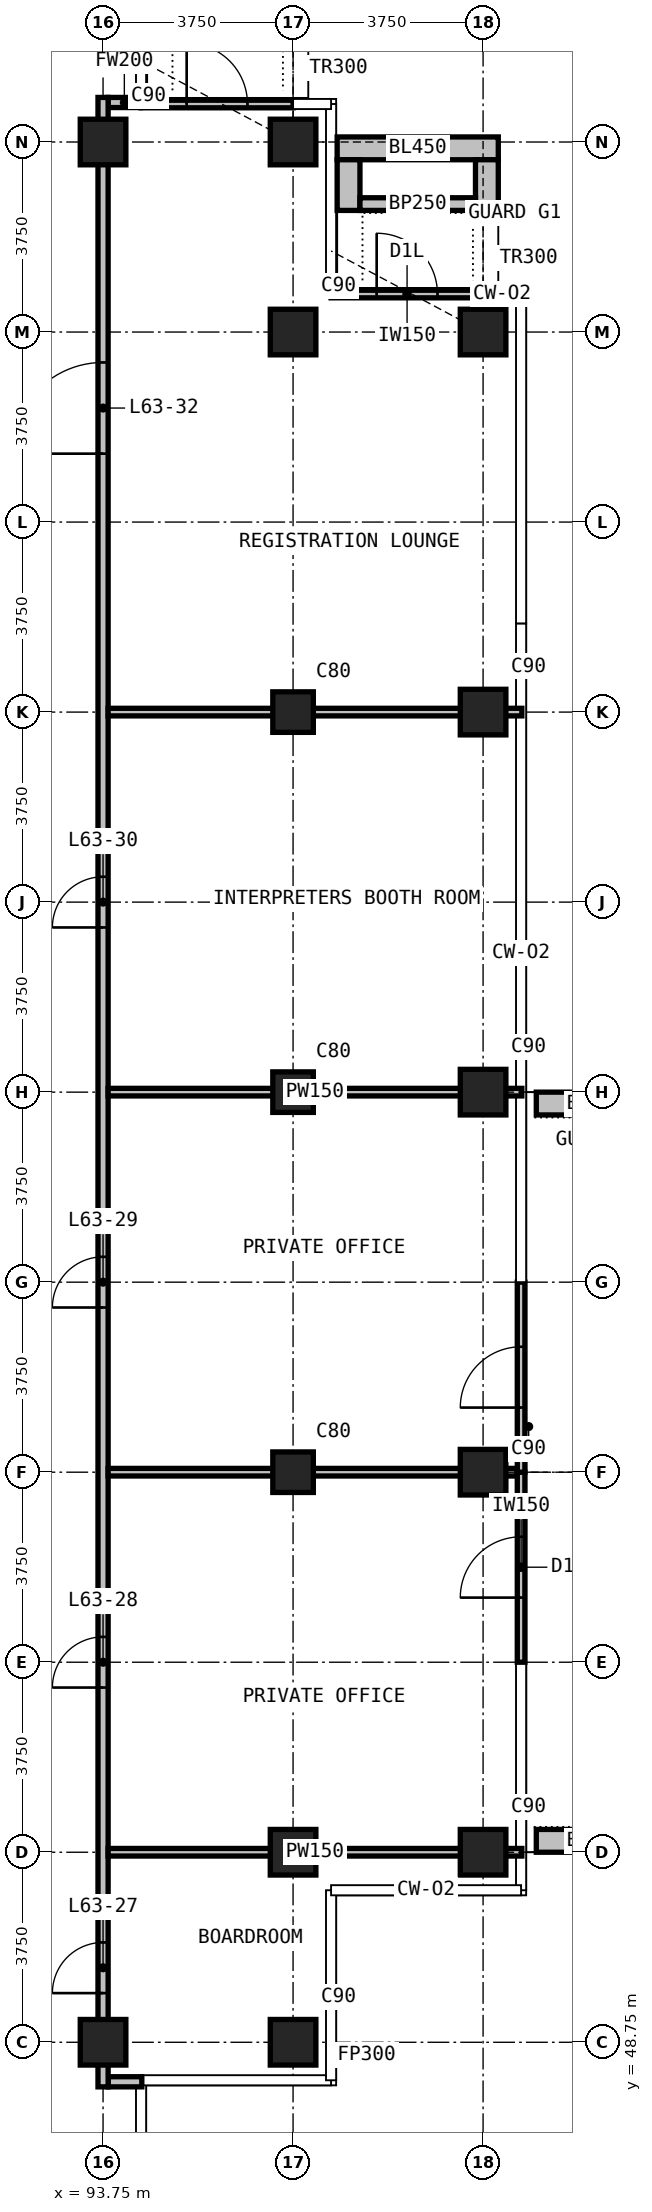
"""IFC4 building model, lengths in metres.
Left out: names, types, materials, properties, quantities, classifications, styles, units other than length and angle.
Written with IfcOpenShell. Run it as: python <this file> out.ifc"""

import sys

from ifc_helpers import new_model, si_unit, direction, frame, frame_2d, origin, origin_2d, place, context, subcontext, project, spatial, rectangle, extrude, element, fill, save


model = new_model("IFC4")
c1 = context("Model", 3, precision=1e-05, world=origin(), true_north=direction((0.0, 1.0)))
c2 = subcontext(c1, "Body", "Model", "MODEL_VIEW")
j1 = project(units=[si_unit("LENGTHUNIT", "METRE"), si_unit("PLANEANGLEUNIT", "RADIAN")], contexts=[c1])
p1 = place(None, origin())
s1 = spatial("IfcSite", under=j1, at=p1, CompositionType="ELEMENT")
p2 = place(p1, origin())
s2 = spatial("IfcBuilding", under=s1, at=p2, CompositionType="ELEMENT")
p3 = place(p2, frame((0.0, 0.0, 242.7)))
s3 = spatial("IfcBuildingStorey", under=s2, at=p3, CompositionType="ELEMENT", Elevation=242.7)
for number, where, z_axis, x_axis in (
    (1, (93.75, 48.75, 0.0), (0.0, 0.0, 1.0), (1.0, 0.0, 0.0)),
    (2, (93.75, 86.25, 0.0), (0.0, 0.0, 1.0), (1.0, 0.0, 0.0)),
    (3, (97.5, 48.75, 0.0), (0.0, 0.0, 1.0), (1.0, 0.0, 0.0)),
    (4, (97.5, 52.5, 0.0), (0.0, 0.0, 1.0), (1.0, 0.0, 0.0)),
):
    element("IfcColumn", number, at=place(p3, frame(where, z_axis=z_axis, x_axis=x_axis)), inside=s3, PredefinedType="COLUMN", context=c2, shape_type="SweptSolid", body=[
        extrude(rectangle(XDim=0.9, YDim=0.9, at=origin_2d()), origin(), (0.0, 0.0, 1.0), 3.6),
    ])
for number, where, z_axis, x_axis in (
    (5, (97.5, 60.0, 0.0), (0.0, 0.0, 1.0), (1.0, 0.0, 0.0)),
    (6, (97.5, 67.5, 0.0), (0.0, 0.0, 1.0), (1.0, 0.0, 0.0)),
    (7, (97.5, 75.0, 0.0), (0.0, 0.0, 1.0), (1.0, 0.0, 0.0)),
):
    element("IfcColumn", number, at=place(p3, frame(where, z_axis=z_axis, x_axis=x_axis)), inside=s3, PredefinedType="COLUMN", context=c2, shape_type="SweptSolid", body=[
        extrude(rectangle(XDim=0.8, YDim=0.8, at=origin_2d()), origin(), (0.0, 0.0, 1.0), 3.6),
    ])
for number, where, z_axis, x_axis in (
    (8, (97.5, 82.5, 0.0), (0.0, 0.0, 1.0), (1.0, 0.0, 0.0)),
    (9, (97.5, 86.25, 0.0), (0.0, 0.0, 1.0), (1.0, 0.0, 0.0)),
    (10, (101.25, 52.5, 0.0), (0.0, 0.0, 1.0), (1.0, 0.0, 0.0)),
    (11, (101.25, 60.0, 0.0), (0.0, 0.0, 1.0), (1.0, 0.0, 0.0)),
    (12, (101.25, 67.5, 0.0), (0.0, 0.0, 1.0), (1.0, 0.0, 0.0)),
    (13, (101.25, 75.0, 0.0), (0.0, 0.0, 1.0), (1.0, 0.0, 0.0)),
    (14, (101.25, 82.5, 0.0), (0.0, 0.0, 1.0), (1.0, 0.0, 0.0)),
):
    element("IfcColumn", number, at=place(p3, frame(where, z_axis=z_axis, x_axis=x_axis)), inside=s3, PredefinedType="COLUMN", context=c2, shape_type="SweptSolid", body=[
        extrude(rectangle(XDim=0.9, YDim=0.9, at=origin_2d()), origin(), (0.0, 0.0, 1.0), 3.6),
    ])
p4 = place(p3, frame((102.0, 56.25, 0.0), z_axis=(0.0, 0.0, 1.0), x_axis=(0.0, 1.0, 0.0)))
e15 = element("IfcWall", 15, at=p4, inside=s3, PredefinedType="SOLIDWALL", context=c2, shape_type="SweptSolid", body=[
    extrude(rectangle(XDim=3.75, YDim=0.15, at=frame_2d((1.875, 0.0))), origin(), (0.0, 0.0, 1.0), 3.3),
])
p5 = place(p4, frame((1.275, 0.0, 0.0)))
e16 = element("IfcOpeningElement", 16, at=p5, cuts=e15, PredefinedType="OPENING", context=c2, shape_type="SweptSolid", body=[
    extrude(rectangle(XDim=1.2, YDim=2.4, at=frame_2d((0.6, 1.2))), frame((0.0, 0.085, 0.0), z_axis=(0.0, -1.0, 0.0), x_axis=(1.0, 0.0, 0.0)), (0.0, 0.0, 1.0), 0.17),
])
p6 = place(p3, frame((102.0, 60.0, 0.0), z_axis=(0.0, 0.0, 1.0), x_axis=(0.0, 1.0, 0.0)))
e17 = element("IfcWall", 17, at=p6, inside=s3, PredefinedType="SOLIDWALL", context=c2, shape_type="SweptSolid", body=[
    extrude(rectangle(XDim=3.75, YDim=0.15, at=frame_2d((1.875, 0.0))), origin(), (0.0, 0.0, 1.0), 3.3),
])
p7 = place(p6, frame((1.275, 0.0, 0.0)))
e18 = element("IfcOpeningElement", 18, at=p7, cuts=e17, PredefinedType="OPENING", context=c2, shape_type="SweptSolid", body=[
    extrude(rectangle(XDim=1.2, YDim=2.4, at=frame_2d((0.6, 1.2))), frame((0.0, 0.085, 0.0), z_axis=(0.0, -1.0, 0.0), x_axis=(1.0, 0.0, 0.0)), (0.0, 0.0, 1.0), 0.17),
])
p8 = place(p3, frame((98.25, 83.25, 0.0), z_axis=(0.0, 0.0, 1.0), x_axis=(1.0, 0.0, 0.0)))
e19 = element("IfcWall", 19, at=p8, inside=s3, PredefinedType="SOLIDWALL", context=c2, shape_type="SweptSolid", body=[
    extrude(rectangle(XDim=3.0, YDim=0.15, at=frame_2d((1.5, 0.0))), origin(), (0.0, 0.0, 1.0), 3.3),
])
p9 = place(p8, frame((0.9, 0.0, 0.0)))
e20 = element("IfcOpeningElement", 20, at=p9, cuts=e19, PredefinedType="OPENING", context=c2, shape_type="SweptSolid", body=[
    extrude(rectangle(XDim=1.2, YDim=2.0, at=frame_2d((0.6, 1.0))), frame((0.0, 0.085, 0.0), z_axis=(0.0, -1.0, 0.0), x_axis=(1.0, 0.0, 0.0)), (0.0, 0.0, 1.0), 0.17),
])
p10 = place(p3, frame((94.5, 87.0, 0.0), z_axis=(0.0, 0.0, 1.0), x_axis=(1.0, 0.0, 0.0)))
e21 = element("IfcWall", 21, at=p10, inside=s3, PredefinedType="SOLIDWALL", context=c2, shape_type="SweptSolid", body=[
    extrude(rectangle(XDim=3.0, YDim=0.15, at=frame_2d((1.5, 0.0))), origin(), (0.0, 0.0, 1.0), 3.3),
])
p11 = place(p10, frame((0.9, 0.0, 0.0)))
e22 = element("IfcOpeningElement", 22, at=p11, cuts=e21, PredefinedType="OPENING", context=c2, shape_type="SweptSolid", body=[
    extrude(rectangle(XDim=1.2, YDim=2.0, at=frame_2d((0.6, 1.0))), frame((0.0, 0.085, 0.0), z_axis=(0.0, -1.0, 0.0), x_axis=(1.0, 0.0, 0.0)), (0.0, 0.0, 1.0), 0.17),
])
for number, where, z_axis, x_axis in (
    (23, (102.3, 52.725, 0.0), (0.0, 0.0, 1.0), (1.0, 0.0, 0.0)),
    (24, (102.3, 67.275, 0.0), (0.0, 0.0, 1.0), (1.0, 0.0, 0.0)),
):
    element("IfcWall", number, at=place(p3, frame(where, z_axis=z_axis, x_axis=x_axis)), inside=s3, PredefinedType="USERDEFINED", context=c2, shape_type="SweptSolid", body=[
        extrude(rectangle(XDim=2.35, YDim=0.45, at=frame_2d((1.175, 0.0))), origin(), (0.0, 0.0, 1.0), 1.1),
    ])
p12 = place(p3, frame((98.37, 86.125, 0.0), z_axis=(0.0, 0.0, 1.0), x_axis=(1.0, 0.0, 0.0)))
e25 = element("IfcWall", 25, at=p12, inside=s3, PredefinedType="USERDEFINED", context=c2, shape_type="SweptSolid", body=[
    extrude(rectangle(XDim=3.18, YDim=0.45, at=frame_2d((1.59, 0.0))), origin(), (0.0, 0.0, 1.0), 1.1),
])
for number, where, z_axis, x_axis in (
    (26, (98.595, 84.9, 0.0), (0.0, 0.0, 1.0), (0.0, 1.0, 0.0)),
    (27, (101.325, 84.9, 0.0), (0.0, 0.0, 1.0), (0.0, 1.0, 0.0)),
):
    element("IfcWall", number, at=place(p3, frame(where, z_axis=z_axis, x_axis=x_axis)), inside=s3, PredefinedType="USERDEFINED", context=c2, shape_type="SweptSolid", body=[
        extrude(rectangle(XDim=1.0, YDim=0.45, at=frame_2d((0.5, 0.0))), origin(), (0.0, 0.0, 1.0), 1.1),
    ])
p13 = place(p3, frame((98.82, 85.025, 0.0), z_axis=(0.0, 0.0, 1.0), x_axis=(1.0, 0.0, 0.0)))
e28 = element("IfcWall", 28, at=p13, inside=s3, PredefinedType="USERDEFINED", context=c2, shape_type="SweptSolid", body=[
    extrude(rectangle(XDim=2.28, YDim=0.25, at=frame_2d((1.14, 0.0))), origin(), (0.0, 0.0, 1.0), 1.0),
])
p14 = place(p3, frame((93.85, 47.97, 0.0), z_axis=(0.0, 0.0, 1.0), x_axis=(1.0, 0.0, 0.0)))
e29 = element("IfcWall", 29, at=p14, inside=s3, PredefinedType="PARTITIONING", context=c2, shape_type="SweptSolid", body=[
    extrude(rectangle(XDim=0.665, YDim=0.2, at=frame_2d((0.333, 0.0))), origin(), (0.0, 0.0, 1.0), 3.3),
])
p15 = place(p3, frame((93.85, 87.03, 0.0), z_axis=(0.0, 0.0, 1.0), x_axis=(1.0, 0.0, 0.0)))
e30 = element("IfcWall", 30, at=p15, inside=s3, PredefinedType="PARTITIONING", context=c2, shape_type="SweptSolid", body=[
    extrude(rectangle(XDim=0.64, YDim=0.2, at=frame_2d((0.32, 0.0))), origin(), (0.0, 0.0, 1.0), 3.3),
])
p16 = place(p3, frame((93.75, 47.87, 0.0), z_axis=(0.0, 0.0, 1.0), x_axis=(0.0, 1.0, 0.0)))
e31 = element("IfcWall", 31, at=p16, inside=s3, PredefinedType="PARTITIONING", context=c2, shape_type="SweptSolid", body=[
    extrude(rectangle(XDim=39.26, YDim=0.2, at=frame_2d((19.63, 0.0))), origin(), (0.0, 0.0, 1.0), 3.3),
])
p17 = place(p16, frame((1.85, 0.0, 0.0)))
e32 = element("IfcOpeningElement", 32, at=p17, cuts=e31, PredefinedType="OPENING", context=c2, shape_type="SweptSolid", body=[
    extrude(rectangle(XDim=1.0, YDim=2.2, at=frame_2d((0.5, 1.1))), frame((0.0, 0.11, 0.0), z_axis=(0.0, -1.0, 0.0), x_axis=(1.0, 0.0, 0.0)), (0.0, 0.0, 1.0), 0.22),
])
p18 = place(p16, frame((7.88, 0.0, 0.0)))
e33 = element("IfcOpeningElement", 33, at=p18, cuts=e31, PredefinedType="OPENING", context=c2, shape_type="SweptSolid", body=[
    extrude(rectangle(XDim=1.0, YDim=2.2, at=frame_2d((0.5, 1.1))), frame((0.0, 0.11, 0.0), z_axis=(0.0, -1.0, 0.0), x_axis=(1.0, 0.0, 0.0)), (0.0, 0.0, 1.0), 0.22),
])
p19 = place(p16, frame((15.38, 0.0, 0.0)))
e34 = element("IfcOpeningElement", 34, at=p19, cuts=e31, PredefinedType="OPENING", context=c2, shape_type="SweptSolid", body=[
    extrude(rectangle(XDim=1.0, YDim=2.2, at=frame_2d((0.5, 1.1))), frame((0.0, 0.11, 0.0), z_axis=(0.0, -1.0, 0.0), x_axis=(1.0, 0.0, 0.0)), (0.0, 0.0, 1.0), 0.22),
])
p20 = place(p16, frame((22.88, 0.0, 0.0)))
e35 = element("IfcOpeningElement", 35, at=p20, cuts=e31, PredefinedType="OPENING", context=c2, shape_type="SweptSolid", body=[
    extrude(rectangle(XDim=1.0, YDim=2.2, at=frame_2d((0.5, 1.1))), frame((0.0, 0.11, 0.0), z_axis=(0.0, -1.0, 0.0), x_axis=(1.0, 0.0, 0.0)), (0.0, 0.0, 1.0), 0.22),
])
p21 = place(p16, frame((32.23, 0.0, 0.0)))
e36 = element("IfcOpeningElement", 36, at=p21, cuts=e31, PredefinedType="OPENING", context=c2, shape_type="SweptSolid", body=[
    extrude(rectangle(XDim=1.8, YDim=2.2, at=frame_2d((0.9, 1.1))), frame((0.0, 0.11, 0.0), z_axis=(0.0, -1.0, 0.0), x_axis=(1.0, 0.0, 0.0)), (0.0, 0.0, 1.0), 0.22),
])
p22 = place(p3, frame((93.85, 52.5, 0.0), z_axis=(0.0, 0.0, 1.0), x_axis=(1.0, 0.0, 0.0)))
e37 = element("IfcWall", 37, at=p22, inside=s3, PredefinedType="PARTITIONING", context=c2, shape_type="SweptSolid", body=[
    extrude(rectangle(XDim=8.165, YDim=0.15, at=frame_2d((4.083, 0.0))), origin(), (0.0, 0.0, 1.0), 3.3),
])
p23 = place(p3, frame((93.85, 60.0, 0.0), z_axis=(0.0, 0.0, 1.0), x_axis=(1.0, 0.0, 0.0)))
e38 = element("IfcWall", 38, at=p23, inside=s3, PredefinedType="PARTITIONING", context=c2, shape_type="SweptSolid", body=[
    extrude(rectangle(XDim=8.065, YDim=0.15, at=frame_2d((4.032, 0.0))), origin(), (0.0, 0.0, 1.0), 3.3),
])
for number, where, z_axis, x_axis in (
    (39, (93.85, 67.5, 0.0), (0.0, 0.0, 1.0), (1.0, 0.0, 0.0)),
    (40, (93.85, 75.0, 0.0), (0.0, 0.0, 1.0), (1.0, 0.0, 0.0)),
):
    element("IfcWall", number, at=place(p3, frame(where, z_axis=z_axis, x_axis=x_axis)), inside=s3, PredefinedType="PARTITIONING", context=c2, shape_type="SweptSolid", body=[
        extrude(rectangle(XDim=8.165, YDim=0.15, at=frame_2d((4.083, 0.0))), origin(), (0.0, 0.0, 1.0), 3.3),
    ])
p24 = place(p5, origin())
e41 = element("IfcDoor", 41, at=p24, inside=s3, OperationType="SINGLE_SWING_LEFT", PredefinedType="DOOR", context=c2, shape_type="SweptSolid", body=[
    extrude(rectangle(XDim=1.2, YDim=2.4, at=frame_2d((0.6, 1.2))), frame((0.0, 0.025, 0.0), z_axis=(0.0, -1.0, 0.0), x_axis=(1.0, 0.0, 0.0)), (0.0, 0.0, 1.0), 0.05),
])
fill(e16, e41)
p25 = place(p7, origin())
e42 = element("IfcDoor", 42, at=p25, inside=s3, OperationType="SINGLE_SWING_LEFT", PredefinedType="DOOR", context=c2, shape_type="SweptSolid", body=[
    extrude(rectangle(XDim=1.2, YDim=2.4, at=frame_2d((0.6, 1.2))), frame((0.0, 0.025, 0.0), z_axis=(0.0, -1.0, 0.0), x_axis=(1.0, 0.0, 0.0)), (0.0, 0.0, 1.0), 0.05),
])
fill(e18, e42)
p26 = place(p9, origin())
e43 = element("IfcDoor", 43, at=p26, inside=s3, OperationType="SINGLE_SWING_LEFT", PredefinedType="DOOR", context=c2, shape_type="SweptSolid", body=[
    extrude(rectangle(XDim=1.2, YDim=2.0, at=frame_2d((0.6, 1.0))), frame((0.0, 0.025, 0.0), z_axis=(0.0, -1.0, 0.0), x_axis=(1.0, 0.0, 0.0)), (0.0, 0.0, 1.0), 0.05),
])
fill(e20, e43)
p27 = place(p11, origin())
e44 = element("IfcDoor", 44, at=p27, inside=s3, OperationType="SINGLE_SWING_LEFT", PredefinedType="DOOR", context=c2, shape_type="SweptSolid", body=[
    extrude(rectangle(XDim=1.2, YDim=2.0, at=frame_2d((0.6, 1.0))), frame((0.0, 0.025, 0.0), z_axis=(0.0, -1.0, 0.0), x_axis=(1.0, 0.0, 0.0)), (0.0, 0.0, 1.0), 0.05),
])
fill(e22, e44)
p28 = place(p17, origin())
e45 = element("IfcDoor", 45, at=p28, inside=s3, OperationType="SINGLE_SWING_RIGHT", PredefinedType="DOOR", context=c2, shape_type="SweptSolid", body=[
    extrude(rectangle(XDim=1.0, YDim=2.2, at=frame_2d((0.5, 1.1))), frame((0.0, 0.025, 0.0), z_axis=(0.0, -1.0, 0.0), x_axis=(1.0, 0.0, 0.0)), (0.0, 0.0, 1.0), 0.05),
])
fill(e32, e45)
p29 = place(p18, origin())
e46 = element("IfcDoor", 46, at=p29, inside=s3, OperationType="SINGLE_SWING_RIGHT", PredefinedType="DOOR", context=c2, shape_type="SweptSolid", body=[
    extrude(rectangle(XDim=1.0, YDim=2.2, at=frame_2d((0.5, 1.1))), frame((0.0, 0.025, 0.0), z_axis=(0.0, -1.0, 0.0), x_axis=(1.0, 0.0, 0.0)), (0.0, 0.0, 1.0), 0.05),
])
fill(e33, e46)
p30 = place(p19, origin())
e47 = element("IfcDoor", 47, at=p30, inside=s3, OperationType="SINGLE_SWING_LEFT", PredefinedType="DOOR", context=c2, shape_type="SweptSolid", body=[
    extrude(rectangle(XDim=1.0, YDim=2.2, at=frame_2d((0.5, 1.1))), frame((0.0, 0.025, 0.0), z_axis=(0.0, -1.0, 0.0), x_axis=(1.0, 0.0, 0.0)), (0.0, 0.0, 1.0), 0.05),
])
fill(e34, e47)
p31 = place(p20, origin())
e48 = element("IfcDoor", 48, at=p31, inside=s3, OperationType="SINGLE_SWING_RIGHT", PredefinedType="DOOR", context=c2, shape_type="SweptSolid", body=[
    extrude(rectangle(XDim=1.0, YDim=2.2, at=frame_2d((0.5, 1.1))), frame((0.0, 0.025, 0.0), z_axis=(0.0, -1.0, 0.0), x_axis=(1.0, 0.0, 0.0)), (0.0, 0.0, 1.0), 0.05),
])
fill(e35, e48)
p32 = place(p21, origin())
e49 = element("IfcDoor", 49, at=p32, inside=s3, OperationType="DOUBLE_DOOR_SINGLE_SWING", PredefinedType="DOOR", context=c2, shape_type="SweptSolid", body=[
    extrude(rectangle(XDim=1.8, YDim=2.2, at=frame_2d((0.9, 1.1))), frame((0.0, 0.025, 0.0), z_axis=(0.0, -1.0, 0.0), x_axis=(1.0, 0.0, 0.0)), (0.0, 0.0, 1.0), 0.05),
])
fill(e36, e49)
save(model, sys.argv[1])
